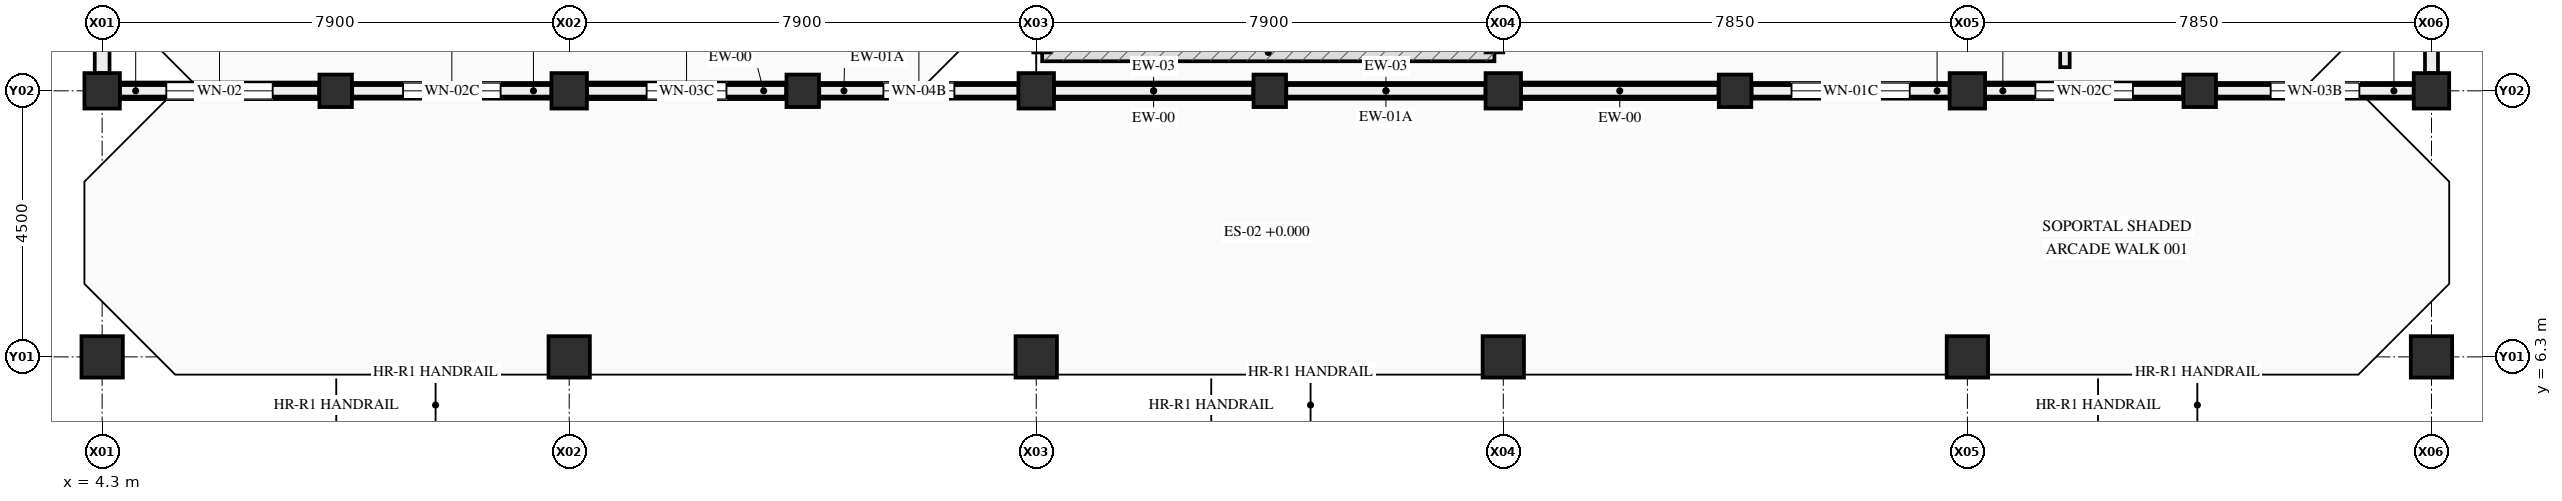
"""IFC4 building model, lengths in metres.
Left out: names, types, materials, properties, quantities, classifications, styles, units other than length and angle.
Written with IfcOpenShell. Run it as: python <this file> out.ifc"""

import sys

from ifc_helpers import new_model, si_unit, direction, frame, frame_2d, origin, origin_2d, place, context, subcontext, project, spatial, rectangle, circle, extrude, element, fill, save


model = new_model("IFC4")
c1 = context("Model", 3, precision=1e-05, world=origin(), true_north=direction((0.0, 1.0)))
c2 = subcontext(c1, "Body", "Model", "MODEL_VIEW")
j1 = project(units=[si_unit("LENGTHUNIT", "METRE"), si_unit("PLANEANGLEUNIT", "RADIAN")], contexts=[c1])
p1 = place(None, origin())
s1 = spatial("IfcSite", under=j1, at=p1, CompositionType="ELEMENT")
p2 = place(p1, origin())
s2 = spatial("IfcBuilding", under=s1, at=p2, CompositionType="ELEMENT")
p3 = place(p2, origin())
s3 = spatial("IfcBuildingStorey", under=s2, at=p3, CompositionType="ELEMENT", Elevation=0.0)
p4 = place(p3, frame((4.3, 6.3, 0.0), z_axis=(0.0, 0.0, 1.0), x_axis=(1.0, 0.0, 0.0)))
e1 = element("IfcColumn", 1, at=p4, inside=s3, PredefinedType="COLUMN", context=c2, shape_type="SweptSolid", body=[
    extrude(circle(Radius=0.35, at=origin_2d()), origin(), (0.0, 0.0, 1.0), 4.5),
])
p5 = place(p3, frame((4.3, 10.8, 0.0), z_axis=(0.0, 0.0, 1.0), x_axis=(1.0, 0.0, 0.0)))
e2 = element("IfcColumn", 2, at=p5, inside=s3, PredefinedType="COLUMN", context=c2, shape_type="SweptSolid", body=[
    extrude(rectangle(XDim=0.6, YDim=0.6, at=origin_2d()), origin(), (0.0, 0.0, 1.0), 4.5),
])
p6 = place(p3, frame((12.2, 6.3, 0.0), z_axis=(0.0, 0.0, 1.0), x_axis=(1.0, 0.0, 0.0)))
e3 = element("IfcColumn", 3, at=p6, inside=s3, PredefinedType="COLUMN", context=c2, shape_type="SweptSolid", body=[
    extrude(circle(Radius=0.35, at=origin_2d()), origin(), (0.0, 0.0, 1.0), 4.5),
])
p7 = place(p3, frame((12.2, 10.8, 0.0), z_axis=(0.0, 0.0, 1.0), x_axis=(1.0, 0.0, 0.0)))
e4 = element("IfcColumn", 4, at=p7, inside=s3, PredefinedType="COLUMN", context=c2, shape_type="SweptSolid", body=[
    extrude(rectangle(XDim=0.6, YDim=0.6, at=origin_2d()), origin(), (0.0, 0.0, 1.0), 4.5),
])
p8 = place(p3, frame((20.1, 6.3, 0.0), z_axis=(0.0, 0.0, 1.0), x_axis=(1.0, 0.0, 0.0)))
e5 = element("IfcColumn", 5, at=p8, inside=s3, PredefinedType="COLUMN", context=c2, shape_type="SweptSolid", body=[
    extrude(circle(Radius=0.35, at=origin_2d()), origin(), (0.0, 0.0, 1.0), 4.5),
])
p9 = place(p3, frame((20.1, 10.8, 0.0), z_axis=(0.0, 0.0, 1.0), x_axis=(1.0, 0.0, 0.0)))
e6 = element("IfcColumn", 6, at=p9, inside=s3, PredefinedType="COLUMN", context=c2, shape_type="SweptSolid", body=[
    extrude(rectangle(XDim=0.6, YDim=0.6, at=origin_2d()), origin(), (0.0, 0.0, 1.0), 4.5),
])
p10 = place(p3, frame((28.0, 6.3, 0.0), z_axis=(0.0, 0.0, 1.0), x_axis=(1.0, 0.0, 0.0)))
e7 = element("IfcColumn", 7, at=p10, inside=s3, PredefinedType="COLUMN", context=c2, shape_type="SweptSolid", body=[
    extrude(circle(Radius=0.35, at=origin_2d()), origin(), (0.0, 0.0, 1.0), 4.5),
])
p11 = place(p3, frame((28.0, 10.8, 0.0), z_axis=(0.0, 0.0, 1.0), x_axis=(1.0, 0.0, 0.0)))
e8 = element("IfcColumn", 8, at=p11, inside=s3, PredefinedType="COLUMN", context=c2, shape_type="SweptSolid", body=[
    extrude(rectangle(XDim=0.6, YDim=0.6, at=origin_2d()), origin(), (0.0, 0.0, 1.0), 4.5),
])
p12 = place(p3, frame((35.85, 6.3, 0.0), z_axis=(0.0, 0.0, 1.0), x_axis=(1.0, 0.0, 0.0)))
e9 = element("IfcColumn", 9, at=p12, inside=s3, PredefinedType="COLUMN", context=c2, shape_type="SweptSolid", body=[
    extrude(circle(Radius=0.35, at=origin_2d()), origin(), (0.0, 0.0, 1.0), 4.5),
])
p13 = place(p3, frame((35.85, 10.8, 0.0), z_axis=(0.0, 0.0, 1.0), x_axis=(1.0, 0.0, 0.0)))
e10 = element("IfcColumn", 10, at=p13, inside=s3, PredefinedType="COLUMN", context=c2, shape_type="SweptSolid", body=[
    extrude(rectangle(XDim=0.6, YDim=0.6, at=origin_2d()), origin(), (0.0, 0.0, 1.0), 4.5),
])
p14 = place(p3, frame((43.7, 6.3, 0.0), z_axis=(0.0, 0.0, 1.0), x_axis=(1.0, 0.0, 0.0)))
e11 = element("IfcColumn", 11, at=p14, inside=s3, PredefinedType="COLUMN", context=c2, shape_type="SweptSolid", body=[
    extrude(circle(Radius=0.35, at=origin_2d()), origin(), (0.0, 0.0, 1.0), 4.5),
])
p15 = place(p3, frame((43.7, 10.8, 0.0), z_axis=(0.0, 0.0, 1.0), x_axis=(1.0, 0.0, 0.0)))
e12 = element("IfcColumn", 12, at=p15, inside=s3, PredefinedType="COLUMN", context=c2, shape_type="SweptSolid", body=[
    extrude(rectangle(XDim=0.6, YDim=0.6, at=origin_2d()), origin(), (0.0, 0.0, 1.0), 4.5),
])
for number, where, z_axis, x_axis in (
    (13, (8.25, 10.8, 0.0), (0.0, 0.0, 1.0), (1.0, 0.0, 0.0)),
    (14, (16.15, 10.8, 0.0), (0.0, 0.0, 1.0), (1.0, 0.0, 0.0)),
    (15, (24.05, 10.8, 0.0), (0.0, 0.0, 1.0), (1.0, 0.0, 0.0)),
    (16, (31.92, 10.8, 0.0), (0.0, 0.0, 1.0), (1.0, 0.0, 0.0)),
    (17, (39.78, 10.8, 0.0), (0.0, 0.0, 1.0), (1.0, 0.0, 0.0)),
):
    element("IfcColumn", number, at=place(p3, frame(where, z_axis=z_axis, x_axis=x_axis)), inside=s3, PredefinedType="PILASTER", context=c2, shape_type="SweptSolid", body=[
        extrude(circle(Radius=0.275, at=origin_2d()), origin(), (0.0, 0.0, 1.0), 4.5),
    ])
p16 = place(p3, frame((7.97, 10.8, 0.0), z_axis=(0.0, 0.0, 1.0), x_axis=(-1.0, 0.0, 0.0)))
e18 = element("IfcWall", 18, at=p16, inside=s3, PredefinedType="STANDARD", context=c2, shape_type="SweptSolid", body=[
    extrude(rectangle(XDim=3.37, YDim=0.28, at=frame_2d((1.685, 0.0))), origin(), (0.0, 0.0, 1.0), 2.985),
])
p17 = place(p16, frame((0.785, 0.0, 0.88)))
e19 = element("IfcOpeningElement", 19, at=p17, cuts=e18, PredefinedType="OPENING", context=c2, shape_type="SweptSolid", body=[
    extrude(rectangle(XDim=1.8, YDim=1.45, at=frame_2d((0.9, 0.725))), frame((0.0, 0.15, 0.0), z_axis=(0.0, -1.0, 0.0), x_axis=(1.0, 0.0, 0.0)), (0.0, 0.0, 1.0), 0.3),
])
p18 = place(p3, frame((7.97, 10.8, 3.35), z_axis=(0.0, 0.0, 1.0), x_axis=(-1.0, 0.0, 0.0)))
e20 = element("IfcWall", 20, at=p18, inside=s3, PredefinedType="STANDARD", context=c2, shape_type="SweptSolid", body=[
    extrude(rectangle(XDim=3.37, YDim=0.195, at=frame_2d((1.685, 0.0))), origin(), (0.0, 0.0, 1.0), 0.23),
])
p19 = place(p3, frame((11.9, 10.8, 0.0), z_axis=(0.0, 0.0, 1.0), x_axis=(-1.0, 0.0, 0.0)))
e21 = element("IfcWall", 21, at=p19, inside=s3, PredefinedType="STANDARD", context=c2, shape_type="SweptSolid", body=[
    extrude(rectangle(XDim=3.37, YDim=0.265, at=frame_2d((1.685, 0.0))), origin(), (0.0, 0.0, 1.0), 2.985),
])
p20 = place(p19, frame((0.86, 0.0, 0.95)))
e22 = element("IfcOpeningElement", 22, at=p20, cuts=e21, PredefinedType="OPENING", context=c2, shape_type="SweptSolid", body=[
    extrude(rectangle(XDim=1.65, YDim=1.45, at=frame_2d((0.825, 0.725))), frame((0.0, 0.142, 0.0), z_axis=(0.0, -1.0, 0.0), x_axis=(1.0, 0.0, 0.0)), (0.0, 0.0, 1.0), 0.285),
])
p21 = place(p3, frame((11.9, 10.8, 3.35), z_axis=(0.0, 0.0, 1.0), x_axis=(-1.0, 0.0, 0.0)))
e23 = element("IfcWall", 23, at=p21, inside=s3, PredefinedType="STANDARD", context=c2, shape_type="SweptSolid", body=[
    extrude(rectangle(XDim=3.37, YDim=0.195, at=frame_2d((1.685, 0.0))), origin(), (0.0, 0.0, 1.0), 0.23),
])
p22 = place(p3, frame((15.87, 10.8, 0.0), z_axis=(0.0, 0.0, 1.0), x_axis=(-1.0, 0.0, 0.0)))
e24 = element("IfcWall", 24, at=p22, inside=s3, PredefinedType="STANDARD", context=c2, shape_type="SweptSolid", body=[
    extrude(rectangle(XDim=3.37, YDim=0.28, at=frame_2d((1.685, 0.0))), origin(), (0.0, 0.0, 1.0), 2.985),
])
p23 = place(p22, frame((1.01, 0.0, 0.98)))
e25 = element("IfcOpeningElement", 25, at=p23, cuts=e24, PredefinedType="OPENING", context=c2, shape_type="SweptSolid", body=[
    extrude(rectangle(XDim=1.35, YDim=1.35, at=frame_2d((0.675, 0.675))), frame((0.0, 0.15, 0.0), z_axis=(0.0, -1.0, 0.0), x_axis=(1.0, 0.0, 0.0)), (0.0, 0.0, 1.0), 0.3),
])
p24 = place(p3, frame((15.87, 10.8, 3.35), z_axis=(0.0, 0.0, 1.0), x_axis=(-1.0, 0.0, 0.0)))
e26 = element("IfcWall", 26, at=p24, inside=s3, PredefinedType="STANDARD", context=c2, shape_type="SweptSolid", body=[
    extrude(rectangle(XDim=3.37, YDim=0.195, at=frame_2d((1.685, 0.0))), origin(), (0.0, 0.0, 1.0), 0.23),
])
p25 = place(p3, frame((19.8, 10.8, 0.0), z_axis=(0.0, 0.0, 1.0), x_axis=(-1.0, 0.0, 0.0)))
e27 = element("IfcWall", 27, at=p25, inside=s3, PredefinedType="STANDARD", context=c2, shape_type="SweptSolid", body=[
    extrude(rectangle(XDim=3.37, YDim=0.265, at=frame_2d((1.685, 0.0))), origin(), (0.0, 0.0, 1.0), 2.985),
])
p26 = place(p25, frame((1.085, 0.0, 1.05)))
e28 = element("IfcOpeningElement", 28, at=p26, cuts=e27, PredefinedType="OPENING", context=c2, shape_type="SweptSolid", body=[
    extrude(rectangle(XDim=1.2, YDim=1.15, at=frame_2d((0.6, 0.575))), frame((0.0, 0.142, 0.0), z_axis=(0.0, -1.0, 0.0), x_axis=(1.0, 0.0, 0.0)), (0.0, 0.0, 1.0), 0.285),
])
p27 = place(p3, frame((19.8, 10.8, 3.35), z_axis=(0.0, 0.0, 1.0), x_axis=(-1.0, 0.0, 0.0)))
e29 = element("IfcWall", 29, at=p27, inside=s3, PredefinedType="STANDARD", context=c2, shape_type="SweptSolid", body=[
    extrude(rectangle(XDim=3.37, YDim=0.195, at=frame_2d((1.685, 0.0))), origin(), (0.0, 0.0, 1.0), 0.23),
])
p28 = place(p3, frame((23.77, 10.8, 0.0), z_axis=(0.0, 0.0, 1.0), x_axis=(-1.0, 0.0, 0.0)))
e30 = element("IfcWall", 30, at=p28, inside=s3, PredefinedType="STANDARD", context=c2, shape_type="SweptSolid", body=[
    extrude(rectangle(XDim=3.37, YDim=0.28, at=frame_2d((1.685, 0.0))), origin(), (0.0, 0.0, 1.0), 2.985),
])
p29 = place(p3, frame((23.77, 10.8, 3.35), z_axis=(0.0, 0.0, 1.0), x_axis=(-1.0, 0.0, 0.0)))
e31 = element("IfcWall", 31, at=p29, inside=s3, PredefinedType="STANDARD", context=c2, shape_type="SweptSolid", body=[
    extrude(rectangle(XDim=3.37, YDim=0.195, at=frame_2d((1.685, 0.0))), origin(), (0.0, 0.0, 1.0), 0.23),
])
p30 = place(p3, frame((27.7, 10.8, 0.0), z_axis=(0.0, 0.0, 1.0), x_axis=(-1.0, 0.0, 0.0)))
e32 = element("IfcWall", 32, at=p30, inside=s3, PredefinedType="STANDARD", context=c2, shape_type="SweptSolid", body=[
    extrude(rectangle(XDim=3.37, YDim=0.265, at=frame_2d((1.685, 0.0))), origin(), (0.0, 0.0, 1.0), 2.985),
])
p31 = place(p3, frame((27.7, 10.8, 3.35), z_axis=(0.0, 0.0, 1.0), x_axis=(-1.0, 0.0, 0.0)))
e33 = element("IfcWall", 33, at=p31, inside=s3, PredefinedType="STANDARD", context=c2, shape_type="SweptSolid", body=[
    extrude(rectangle(XDim=3.37, YDim=0.195, at=frame_2d((1.685, 0.0))), origin(), (0.0, 0.0, 1.0), 0.23),
])
p32 = place(p3, frame((31.64, 10.8, 0.0), z_axis=(0.0, 0.0, 1.0), x_axis=(-1.0, 0.0, 0.0)))
e34 = element("IfcWall", 34, at=p32, inside=s3, PredefinedType="STANDARD", context=c2, shape_type="SweptSolid", body=[
    extrude(rectangle(XDim=3.34, YDim=0.28, at=frame_2d((1.67, 0.0))), origin(), (0.0, 0.0, 1.0), 2.985),
])
p33 = place(p3, frame((31.64, 10.8, 3.35), z_axis=(0.0, 0.0, 1.0), x_axis=(-1.0, 0.0, 0.0)))
e35 = element("IfcWall", 35, at=p33, inside=s3, PredefinedType="STANDARD", context=c2, shape_type="SweptSolid", body=[
    extrude(rectangle(XDim=3.34, YDim=0.195, at=frame_2d((1.67, 0.0))), origin(), (0.0, 0.0, 1.0), 0.23),
])
p34 = place(p3, frame((35.55, 10.8, 0.0), z_axis=(0.0, 0.0, 1.0), x_axis=(-1.0, 0.0, 0.0)))
e36 = element("IfcWall", 36, at=p34, inside=s3, PredefinedType="STANDARD", context=c2, shape_type="SweptSolid", body=[
    extrude(rectangle(XDim=3.35, YDim=0.265, at=frame_2d((1.675, 0.0))), origin(), (0.0, 0.0, 1.0), 2.985),
])
p35 = place(p34, frame((0.675, 0.0, 0.92)))
e37 = element("IfcOpeningElement", 37, at=p35, cuts=e36, PredefinedType="OPENING", context=c2, shape_type="SweptSolid", body=[
    extrude(rectangle(XDim=2.0, YDim=1.5, at=frame_2d((1.0, 0.75))), frame((0.0, 0.142, 0.0), z_axis=(0.0, -1.0, 0.0), x_axis=(1.0, 0.0, 0.0)), (0.0, 0.0, 1.0), 0.285),
])
p36 = place(p3, frame((35.55, 10.8, 3.35), z_axis=(0.0, 0.0, 1.0), x_axis=(-1.0, 0.0, 0.0)))
e38 = element("IfcWall", 38, at=p36, inside=s3, PredefinedType="STANDARD", context=c2, shape_type="SweptSolid", body=[
    extrude(rectangle(XDim=3.35, YDim=0.195, at=frame_2d((1.675, 0.0))), origin(), (0.0, 0.0, 1.0), 0.23),
])
p37 = place(p3, frame((39.5, 10.8, 0.0), z_axis=(0.0, 0.0, 1.0), x_axis=(-1.0, 0.0, 0.0)))
e39 = element("IfcWall", 39, at=p37, inside=s3, PredefinedType="STANDARD", context=c2, shape_type="SweptSolid", body=[
    extrude(rectangle(XDim=3.35, YDim=0.28, at=frame_2d((1.675, 0.0))), origin(), (0.0, 0.0, 1.0), 2.985),
])
p38 = place(p37, frame((0.85, 0.0, 0.95)))
e40 = element("IfcOpeningElement", 40, at=p38, cuts=e39, PredefinedType="OPENING", context=c2, shape_type="SweptSolid", body=[
    extrude(rectangle(XDim=1.65, YDim=1.45, at=frame_2d((0.825, 0.725))), frame((0.0, 0.15, 0.0), z_axis=(0.0, -1.0, 0.0), x_axis=(1.0, 0.0, 0.0)), (0.0, 0.0, 1.0), 0.3),
])
p39 = place(p3, frame((39.5, 10.8, 3.35), z_axis=(0.0, 0.0, 1.0), x_axis=(-1.0, 0.0, 0.0)))
e41 = element("IfcWall", 41, at=p39, inside=s3, PredefinedType="STANDARD", context=c2, shape_type="SweptSolid", body=[
    extrude(rectangle(XDim=3.35, YDim=0.195, at=frame_2d((1.675, 0.0))), origin(), (0.0, 0.0, 1.0), 0.23),
])
p40 = place(p3, frame((43.4, 10.8, 0.0), z_axis=(0.0, 0.0, 1.0), x_axis=(-1.0, 0.0, 0.0)))
e42 = element("IfcWall", 42, at=p40, inside=s3, PredefinedType="STANDARD", context=c2, shape_type="SweptSolid", body=[
    extrude(rectangle(XDim=3.34, YDim=0.265, at=frame_2d((1.67, 0.0))), origin(), (0.0, 0.0, 1.0), 2.985),
])
p41 = place(p40, frame((0.92, 0.0, 1.0)))
e43 = element("IfcOpeningElement", 43, at=p41, cuts=e42, PredefinedType="OPENING", context=c2, shape_type="SweptSolid", body=[
    extrude(rectangle(XDim=1.5, YDim=1.25, at=frame_2d((0.75, 0.625))), frame((0.0, 0.142, 0.0), z_axis=(0.0, -1.0, 0.0), x_axis=(1.0, 0.0, 0.0)), (0.0, 0.0, 1.0), 0.285),
])
p42 = place(p3, frame((43.4, 10.8, 3.35), z_axis=(0.0, 0.0, 1.0), x_axis=(-1.0, 0.0, 0.0)))
e44 = element("IfcWall", 44, at=p42, inside=s3, PredefinedType="STANDARD", context=c2, shape_type="SweptSolid", body=[
    extrude(rectangle(XDim=3.34, YDim=0.195, at=frame_2d((1.67, 0.0))), origin(), (0.0, 0.0, 1.0), 0.23),
])
p43 = place(p3, frame((4.3, 11.1, 0.0), z_axis=(0.0, 0.0, 1.0), x_axis=(0.0, 1.0, 0.0)))
e45 = element("IfcWall", 45, at=p43, inside=s3, PredefinedType="STANDARD", context=c2, shape_type="SweptSolid", body=[
    extrude(rectangle(XDim=6.85, YDim=0.25, at=frame_2d((3.425, 0.0))), origin(), (0.0, 0.0, 1.0), 3.58),
])
p44 = place(p43, frame((2.825, 0.0, 1.0)))
e46 = element("IfcOpeningElement", 46, at=p44, cuts=e45, PredefinedType="OPENING", context=c2, shape_type="SweptSolid", body=[
    extrude(rectangle(XDim=1.2, YDim=1.35, at=frame_2d((0.6, 0.675))), frame((0.0, 0.135, 0.0), z_axis=(0.0, -1.0, 0.0), x_axis=(1.0, 0.0, 0.0)), (0.0, 0.0, 1.0), 0.27),
])
p45 = place(p3, frame((43.7, 17.95, 0.0), z_axis=(0.0, 0.0, 1.0), x_axis=(0.0, -1.0, 0.0)))
e47 = element("IfcWall", 47, at=p45, inside=s3, PredefinedType="STANDARD", context=c2, shape_type="SweptSolid", body=[
    extrude(rectangle(XDim=6.85, YDim=0.22, at=frame_2d((3.425, 0.0))), origin(), (0.0, 0.0, 1.0), 3.58),
])
p46 = place(p3, frame((20.2, 11.45, 0.0), z_axis=(0.0, 0.0, 1.0), x_axis=(1.0, 0.0, 0.0)))
e48 = element("IfcWall", 48, at=p46, inside=s3, PredefinedType="SHEAR", context=c2, shape_type="SweptSolid", body=[
    extrude(rectangle(XDim=7.65, YDim=0.3, at=frame_2d((3.825, 0.0))), origin(), (0.0, 0.0, 1.0), 4.26),
])
p47 = place(p3, frame((37.5, 11.2, 0.0), z_axis=(0.0, 0.0, 1.0), x_axis=(0.0, 1.0, 0.0)))
e49 = element("IfcWall", 49, at=p47, inside=s3, PredefinedType="PARTITIONING", context=c2, shape_type="SweptSolid", body=[
    extrude(rectangle(XDim=3.8, YDim=0.16, at=frame_2d((1.9, 0.0))), origin(), (0.0, 0.0, 1.0), 3.3),
])
p48 = place(p47, frame((1.375, 0.0, 0.0)))
e50 = element("IfcOpeningElement", 50, at=p48, cuts=e49, PredefinedType="OPENING", context=c2, shape_type="SweptSolid", body=[
    extrude(rectangle(XDim=1.05, YDim=2.2, at=frame_2d((0.525, 1.1))), frame((0.0, 0.09, 0.0), z_axis=(0.0, -1.0, 0.0), x_axis=(1.0, 0.0, 0.0)), (0.0, 0.0, 1.0), 0.18),
])
p49 = place(p17, origin())
e51 = element("IfcWindow", 51, at=p49, inside=s3, PartitioningType="SINGLE_PANEL", PredefinedType="WINDOW", context=c2, shape_type="SweptSolid", body=[
    extrude(rectangle(XDim=1.8, YDim=1.45, at=frame_2d((0.9, 0.725))), frame((0.0, 0.03, 0.0), z_axis=(0.0, -1.0, 0.0), x_axis=(1.0, 0.0, 0.0)), (0.0, 0.0, 1.0), 0.06),
])
fill(e19, e51)
p50 = place(p20, origin())
e52 = element("IfcWindow", 52, at=p50, inside=s3, PartitioningType="SINGLE_PANEL", PredefinedType="WINDOW", context=c2, shape_type="SweptSolid", body=[
    extrude(rectangle(XDim=1.65, YDim=1.45, at=frame_2d((0.825, 0.725))), frame((0.0, 0.03, 0.0), z_axis=(0.0, -1.0, 0.0), x_axis=(1.0, 0.0, 0.0)), (0.0, 0.0, 1.0), 0.06),
])
fill(e22, e52)
p51 = place(p23, origin())
e53 = element("IfcWindow", 53, at=p51, inside=s3, PartitioningType="SINGLE_PANEL", PredefinedType="WINDOW", context=c2, shape_type="SweptSolid", body=[
    extrude(rectangle(XDim=1.35, YDim=1.35, at=frame_2d((0.675, 0.675))), frame((0.0, 0.03, 0.0), z_axis=(0.0, -1.0, 0.0), x_axis=(1.0, 0.0, 0.0)), (0.0, 0.0, 1.0), 0.06),
])
fill(e25, e53)
p52 = place(p26, origin())
e54 = element("IfcWindow", 54, at=p52, inside=s3, PartitioningType="SINGLE_PANEL", PredefinedType="WINDOW", context=c2, shape_type="SweptSolid", body=[
    extrude(rectangle(XDim=1.2, YDim=1.15, at=frame_2d((0.6, 0.575))), frame((0.0, 0.03, 0.0), z_axis=(0.0, -1.0, 0.0), x_axis=(1.0, 0.0, 0.0)), (0.0, 0.0, 1.0), 0.06),
])
fill(e28, e54)
p53 = place(p35, origin())
e55 = element("IfcWindow", 55, at=p53, inside=s3, PartitioningType="SINGLE_PANEL", PredefinedType="WINDOW", context=c2, shape_type="SweptSolid", body=[
    extrude(rectangle(XDim=2.0, YDim=1.5, at=frame_2d((1.0, 0.75))), frame((0.0, 0.03, 0.0), z_axis=(0.0, -1.0, 0.0), x_axis=(1.0, 0.0, 0.0)), (0.0, 0.0, 1.0), 0.06),
])
fill(e37, e55)
p54 = place(p38, origin())
e56 = element("IfcWindow", 56, at=p54, inside=s3, PartitioningType="SINGLE_PANEL", PredefinedType="WINDOW", context=c2, shape_type="SweptSolid", body=[
    extrude(rectangle(XDim=1.65, YDim=1.45, at=frame_2d((0.825, 0.725))), frame((0.0, 0.03, 0.0), z_axis=(0.0, -1.0, 0.0), x_axis=(1.0, 0.0, 0.0)), (0.0, 0.0, 1.0), 0.06),
])
fill(e40, e56)
p55 = place(p41, origin())
e57 = element("IfcWindow", 57, at=p55, inside=s3, PartitioningType="SINGLE_PANEL", PredefinedType="WINDOW", context=c2, shape_type="SweptSolid", body=[
    extrude(rectangle(XDim=1.5, YDim=1.25, at=frame_2d((0.75, 0.625))), frame((0.0, 0.03, 0.0), z_axis=(0.0, -1.0, 0.0), x_axis=(1.0, 0.0, 0.0)), (0.0, 0.0, 1.0), 0.06),
])
fill(e43, e57)
save(model, sys.argv[1])
